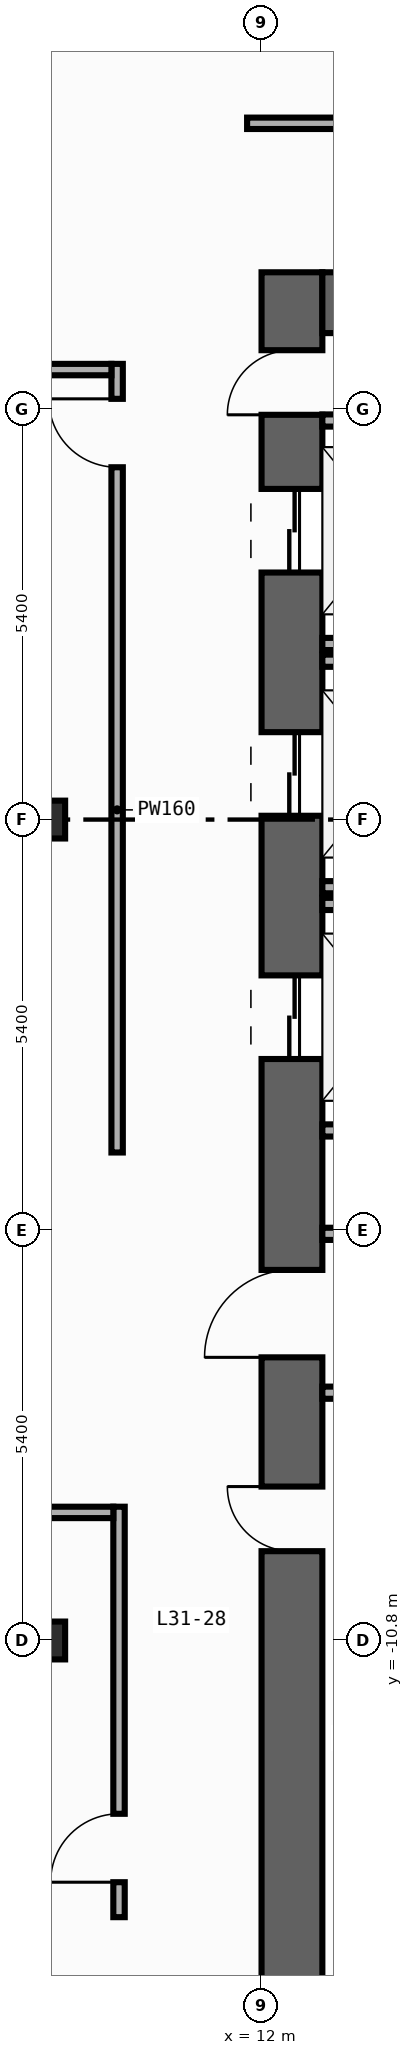
"""IFC4 building model, lengths in metres.
Left out: names, types, materials, properties, quantities, classifications, styles, units other than length and angle.
Written with IfcOpenShell. Run it as: python <this file> out.ifc"""

import sys

from ifc_helpers import new_model, si_unit, direction, frame, frame_2d, origin, origin_2d, place, context, subcontext, project, spatial, rectangle, i_section, extrude, element, fill, save


model = new_model("IFC4")
c1 = context("Model", 3, precision=1e-05, world=origin(), true_north=direction((0.0, 1.0)))
c2 = subcontext(c1, "Body", "Model", "MODEL_VIEW")
j1 = project(units=[si_unit("LENGTHUNIT", "METRE"), si_unit("PLANEANGLEUNIT", "RADIAN")], contexts=[c1])
p1 = place(None, origin())
s1 = spatial("IfcSite", under=j1, at=p1, CompositionType="ELEMENT")
p2 = place(p1, origin())
s2 = spatial("IfcBuilding", under=s1, at=p2, CompositionType="ELEMENT")
p3 = place(p2, frame((0.0, 0.0, 135.2)))
s3 = spatial("IfcBuildingStorey", under=s2, at=p3, CompositionType="ELEMENT", Elevation=135.2)
p4 = place(p3, frame((12.4, -19.8, 0.0), z_axis=(0.0, 0.0, 1.0), x_axis=(0.0, 1.0, 0.0)))
e1 = element("IfcWall", 1, at=p4, inside=s3, PredefinedType="SHEAR", context=c2, shape_type="SweptSolid", body=[
    extrude(rectangle(XDim=27.0, YDim=0.8, at=frame_2d((13.5, 0.0))), origin(), (0.0, 0.0, 1.0), 3.94),
])
p5 = place(p4, frame((23.05, 0.0, 0.0)))
e2 = element("IfcOpeningElement", 2, at=p5, cuts=e1, PredefinedType="OPENING", context=c2, shape_type="SweptSolid", body=[
    extrude(rectangle(XDim=1.1, YDim=2.2, at=frame_2d((0.55, 1.1))), frame((0.0, 0.41, 0.0), z_axis=(0.0, -1.0, 0.0), x_axis=(1.0, 0.0, 0.0)), (0.0, 0.0, 1.0), 0.82),
])
p6 = place(p4, frame((19.85, 0.0, 0.0)))
e3 = element("IfcOpeningElement", 3, at=p6, cuts=e1, PredefinedType="OPENING", context=c2, shape_type="SweptSolid", body=[
    extrude(rectangle(XDim=1.1, YDim=2.2, at=frame_2d((0.55, 1.1))), frame((0.0, 0.41, 0.0), z_axis=(0.0, -1.0, 0.0), x_axis=(1.0, 0.0, 0.0)), (0.0, 0.0, 1.0), 0.82),
])
p7 = place(p4, frame((16.65, 0.0, 0.0)))
e4 = element("IfcOpeningElement", 4, at=p7, cuts=e1, PredefinedType="OPENING", context=c2, shape_type="SweptSolid", body=[
    extrude(rectangle(XDim=1.1, YDim=2.2, at=frame_2d((0.55, 1.1))), frame((0.0, 0.41, 0.0), z_axis=(0.0, -1.0, 0.0), x_axis=(1.0, 0.0, 0.0)), (0.0, 0.0, 1.0), 0.82),
])
p8 = place(p4, frame((10.175, 0.0, 0.0)))
e5 = element("IfcOpeningElement", 5, at=p8, cuts=e1, PredefinedType="OPENING", context=c2, shape_type="SweptSolid", body=[
    extrude(rectangle(XDim=0.85, YDim=2.1, at=frame_2d((0.425, 1.05))), frame((0.0, 0.41, 0.0), z_axis=(0.0, -1.0, 0.0), x_axis=(1.0, 0.0, 0.0)), (0.0, 0.0, 1.0), 0.82),
])
p9 = place(p4, frame((12.725, 0.0, 0.0)))
e6 = element("IfcOpeningElement", 6, at=p9, cuts=e1, PredefinedType="OPENING", context=c2, shape_type="SweptSolid", body=[
    extrude(rectangle(XDim=1.15, YDim=2.2, at=frame_2d((0.575, 1.1))), frame((0.0, 0.41, 0.0), z_axis=(0.0, -1.0, 0.0), x_axis=(1.0, 0.0, 0.0)), (0.0, 0.0, 1.0), 0.82),
])
p10 = place(p4, frame((25.125, 0.0, 0.0)))
e7 = element("IfcOpeningElement", 7, at=p10, cuts=e1, PredefinedType="OPENING", context=c2, shape_type="SweptSolid", body=[
    extrude(rectangle(XDim=0.85, YDim=2.1, at=frame_2d((0.425, 1.05))), frame((0.0, 0.41, 0.0), z_axis=(0.0, -1.0, 0.0), x_axis=(1.0, 0.0, 0.0)), (0.0, 0.0, 1.0), 0.82),
])
p11 = place(p3, frame((12.8, 6.8, 0.0), z_axis=(0.0, 0.0, 1.0), x_axis=(1.0, 0.0, 0.0)))
e8 = element("IfcWall", 8, at=p11, inside=s3, PredefinedType="SHEAR", context=c2, shape_type="SweptSolid", body=[
    extrude(rectangle(XDim=6.8, YDim=0.8, at=frame_2d((3.4, 0.0))), origin(), (0.0, 0.0, 1.0), 3.94),
])
for number, where, z_axis, x_axis in (
    (9, (9.2, -10.8, 0.0), (0.0, 0.0, 1.0), (1.0, 0.0, 0.0)),
    (10, (9.2, 0.0, 0.0), (0.0, 0.0, 1.0), (1.0, 0.0, 0.0)),
):
    element("IfcColumn", number, at=place(p3, frame(where, z_axis=z_axis, x_axis=x_axis)), inside=s3, PredefinedType="COLUMN", context=c2, shape_type="SweptSolid", body=[
        extrude(i_section(OverallWidth=0.432, OverallDepth=0.498, WebThickness=0.045, FlangeThickness=0.07, FilletRadius=0.022, at=origin_2d()), origin(), (0.0, 0.0, 1.0), 4.2),
    ])
for number, where, z_axis, x_axis in (
    (11, (12.8, 2.31, 0.0), (0.0, 0.0, 1.0), (1.0, 0.0, 0.0)),
    (12, (12.8, -0.89, 0.0), (0.0, 0.0, 1.0), (1.0, 0.0, 0.0)),
    (13, (12.8, 2.09, 0.0), (0.0, 0.0, 1.0), (1.0, 0.0, 0.0)),
    (14, (12.8, -4.09, 0.0), (0.0, 0.0, 1.0), (1.0, 0.0, 0.0)),
    (15, (12.8, -1.11, 0.0), (0.0, 0.0, 1.0), (1.0, 0.0, 0.0)),
):
    element("IfcWall", number, at=place(p3, frame(where, z_axis=z_axis, x_axis=x_axis)), inside=s3, PredefinedType="STANDARD", context=c2, shape_type="SweptSolid", body=[
        extrude(rectangle(XDim=2.19, YDim=0.16, at=frame_2d((1.095, 0.0))), origin(), (0.0, 0.0, 1.0), 3.94),
    ])
for number, where, z_axis, x_axis in (
    (16, (12.8, -5.45, 0.0), (0.0, 0.0, 1.0), (1.0, 0.0, 0.0)),
    (17, (12.8, -7.54, 0.0), (0.0, 0.0, 1.0), (1.0, 0.0, 0.0)),
    (18, (12.8, 5.25, 0.0), (0.0, 0.0, 1.0), (1.0, 0.0, 0.0)),
):
    element("IfcWall", number, at=place(p3, frame(where, z_axis=z_axis, x_axis=x_axis)), inside=s3, PredefinedType="STANDARD", context=c2, shape_type="SweptSolid", body=[
        extrude(rectangle(XDim=2.6, YDim=0.16, at=frame_2d((1.3, 0.0))), origin(), (0.0, 0.0, 1.0), 3.94),
    ])
p12 = place(p3, frame((10.1, -4.38, 0.0), z_axis=(0.0, 0.0, 1.0), x_axis=(0.0, 1.0, 0.0)))
e19 = element("IfcWall", 19, at=p12, inside=s3, PredefinedType="PARTITIONING", context=c2, shape_type="SweptSolid", body=[
    extrude(rectangle(XDim=10.375, YDim=0.15, at=frame_2d((5.188, 0.0))), origin(), (0.0, 0.0, 1.0), 3.94),
])
p13 = place(p12, frame((9.015, 0.0, 0.0)))
e20 = element("IfcOpeningElement", 20, at=p13, cuts=e19, PredefinedType="OPENING", context=c2, shape_type="SweptSolid", body=[
    extrude(rectangle(XDim=0.9, YDim=2.15, at=frame_2d((0.45, 1.075))), frame((0.0, 0.085, 0.0), z_axis=(0.0, -1.0, 0.0), x_axis=(1.0, 0.0, 0.0)), (0.0, 0.0, 1.0), 0.17),
])
p14 = place(p3, frame((10.125, -14.44, 0.0), z_axis=(0.0, 0.0, 1.0), x_axis=(0.0, 1.0, 0.0)))
e21 = element("IfcWall", 21, at=p14, inside=s3, PredefinedType="PARTITIONING", context=c2, shape_type="SweptSolid", body=[
    extrude(rectangle(XDim=5.4, YDim=0.15, at=frame_2d((2.7, 0.0))), origin(), (0.0, 0.0, 1.0), 3.94),
])
p15 = place(p14, frame((0.46, 0.0, 0.0)))
e22 = element("IfcOpeningElement", 22, at=p15, cuts=e21, PredefinedType="OPENING", context=c2, shape_type="SweptSolid", body=[
    extrude(rectangle(XDim=0.9, YDim=2.15, at=frame_2d((0.45, 1.075))), frame((0.0, 0.085, 0.0), z_axis=(0.0, -1.0, 0.0), x_axis=(1.0, 0.0, 0.0)), (0.0, 0.0, 1.0), 0.17),
])
p16 = place(p3, frame((0.78, 5.92, 0.0), z_axis=(0.0, 0.0, 1.0), x_axis=(1.0, 0.0, 0.0)))
e23 = element("IfcWall", 23, at=p16, inside=s3, PredefinedType="PARTITIONING", context=c2, shape_type="SweptSolid", body=[
    extrude(rectangle(XDim=9.245, YDim=0.15, at=frame_2d((4.623, 0.0))), origin(), (0.0, 0.0, 1.0), 3.94),
])
p17 = place(p16, frame((0.46, 0.0, 0.0)))
e24 = element("IfcOpeningElement", 24, at=p17, cuts=e23, PredefinedType="OPENING", context=c2, shape_type="SweptSolid", body=[
    extrude(rectangle(XDim=0.9, YDim=2.15, at=frame_2d((0.45, 1.075))), frame((0.0, 0.085, 0.0), z_axis=(0.0, -1.0, 0.0), x_axis=(1.0, 0.0, 0.0)), (0.0, 0.0, 1.0), 0.17),
])
p18 = place(p3, frame((-0.015, -9.115, 0.0), z_axis=(0.0, 0.0, 1.0), x_axis=(1.0, 0.0, 0.0)))
e25 = element("IfcWall", 25, at=p18, inside=s3, PredefinedType="PARTITIONING", context=c2, shape_type="SweptSolid", body=[
    extrude(rectangle(XDim=10.065, YDim=0.15, at=frame_2d((5.032, 0.0))), origin(), (0.0, 0.0, 1.0), 3.94),
])
p19 = place(p18, frame((0.46, 0.0, 0.0)))
e26 = element("IfcOpeningElement", 26, at=p19, cuts=e25, PredefinedType="OPENING", context=c2, shape_type="SweptSolid", body=[
    extrude(rectangle(XDim=0.9, YDim=2.15, at=frame_2d((0.45, 1.075))), frame((0.0, 0.085, 0.0), z_axis=(0.0, -1.0, 0.0), x_axis=(1.0, 0.0, 0.0)), (0.0, 0.0, 1.0), 0.17),
])
p20 = place(p3, frame((11.81, 9.16, 0.0), z_axis=(0.0, 0.0, 1.0), x_axis=(1.0, 0.0, 0.0)))
e27 = element("IfcWall", 27, at=p20, inside=s3, PredefinedType="PARTITIONING", context=c2, shape_type="SweptSolid", body=[
    extrude(rectangle(XDim=8.83, YDim=0.15, at=frame_2d((4.415, 0.0))), origin(), (0.0, 0.0, 1.0), 3.94),
])
p21 = place(p20, frame((5.067, 0.0, 0.0)))
e28 = element("IfcOpeningElement", 28, at=p21, cuts=e27, PredefinedType="OPENING", context=c2, shape_type="SweptSolid", body=[
    extrude(rectangle(XDim=0.9, YDim=2.15, at=frame_2d((0.45, 1.075))), frame((0.0, 0.085, 0.0), z_axis=(0.0, -1.0, 0.0), x_axis=(1.0, 0.0, 0.0)), (0.0, 0.0, 1.0), 0.17),
])
p22 = place(p5, origin())
e29 = element("IfcDoor", 29, at=p22, inside=s3, OperationType="DOUBLE_DOOR_SLIDING", PredefinedType="DOOR", context=c2, shape_type="SweptSolid", body=[
    extrude(rectangle(XDim=1.1, YDim=2.2, at=frame_2d((0.55, 1.1))), frame((0.0, 0.025, 0.0), z_axis=(0.0, -1.0, 0.0), x_axis=(1.0, 0.0, 0.0)), (0.0, 0.0, 1.0), 0.05),
])
fill(e2, e29)
p23 = place(p6, origin())
e30 = element("IfcDoor", 30, at=p23, inside=s3, OperationType="DOUBLE_DOOR_SLIDING", PredefinedType="DOOR", context=c2, shape_type="SweptSolid", body=[
    extrude(rectangle(XDim=1.1, YDim=2.2, at=frame_2d((0.55, 1.1))), frame((0.0, 0.025, 0.0), z_axis=(0.0, -1.0, 0.0), x_axis=(1.0, 0.0, 0.0)), (0.0, 0.0, 1.0), 0.05),
])
fill(e3, e30)
p24 = place(p7, origin())
e31 = element("IfcDoor", 31, at=p24, inside=s3, OperationType="DOUBLE_DOOR_SLIDING", PredefinedType="DOOR", context=c2, shape_type="SweptSolid", body=[
    extrude(rectangle(XDim=1.1, YDim=2.2, at=frame_2d((0.55, 1.1))), frame((0.0, 0.025, 0.0), z_axis=(0.0, -1.0, 0.0), x_axis=(1.0, 0.0, 0.0)), (0.0, 0.0, 1.0), 0.05),
])
fill(e4, e31)
p25 = place(p8, origin())
e32 = element("IfcDoor", 32, at=p25, inside=s3, OperationType="SINGLE_SWING_RIGHT", PredefinedType="DOOR", context=c2, shape_type="SweptSolid", body=[
    extrude(rectangle(XDim=0.85, YDim=2.1, at=frame_2d((0.425, 1.05))), frame((0.0, 0.025, 0.0), z_axis=(0.0, -1.0, 0.0), x_axis=(1.0, 0.0, 0.0)), (0.0, 0.0, 1.0), 0.05),
])
fill(e5, e32)
p26 = place(p9, origin())
e33 = element("IfcDoor", 33, at=p26, inside=s3, OperationType="SINGLE_SWING_LEFT", PredefinedType="DOOR", context=c2, shape_type="SweptSolid", body=[
    extrude(rectangle(XDim=1.15, YDim=2.2, at=frame_2d((0.575, 1.1))), frame((0.0, 0.025, 0.0), z_axis=(0.0, -1.0, 0.0), x_axis=(1.0, 0.0, 0.0)), (0.0, 0.0, 1.0), 0.05),
])
fill(e6, e33)
p27 = place(p10, origin())
e34 = element("IfcDoor", 34, at=p27, inside=s3, OperationType="SINGLE_SWING_LEFT", PredefinedType="DOOR", context=c2, shape_type="SweptSolid", body=[
    extrude(rectangle(XDim=0.85, YDim=2.1, at=frame_2d((0.425, 1.05))), frame((0.0, 0.025, 0.0), z_axis=(0.0, -1.0, 0.0), x_axis=(1.0, 0.0, 0.0)), (0.0, 0.0, 1.0), 0.05),
])
fill(e7, e34)
p28 = place(p13, origin())
e35 = element("IfcDoor", 35, at=p28, inside=s3, OperationType="SINGLE_SWING_RIGHT", PredefinedType="DOOR", context=c2, shape_type="SweptSolid", body=[
    extrude(rectangle(XDim=0.9, YDim=2.15, at=frame_2d((0.45, 1.075))), frame((0.0, 0.025, 0.0), z_axis=(0.0, -1.0, 0.0), x_axis=(1.0, 0.0, 0.0)), (0.0, 0.0, 1.0), 0.05),
])
fill(e20, e35)
p29 = place(p15, origin())
e36 = element("IfcDoor", 36, at=p29, inside=s3, OperationType="SINGLE_SWING_LEFT", PredefinedType="DOOR", context=c2, shape_type="SweptSolid", body=[
    extrude(rectangle(XDim=0.9, YDim=2.15, at=frame_2d((0.45, 1.075))), frame((0.0, 0.025, 0.0), z_axis=(0.0, -1.0, 0.0), x_axis=(1.0, 0.0, 0.0)), (0.0, 0.0, 1.0), 0.05),
])
fill(e22, e36)
save(model, sys.argv[1])
